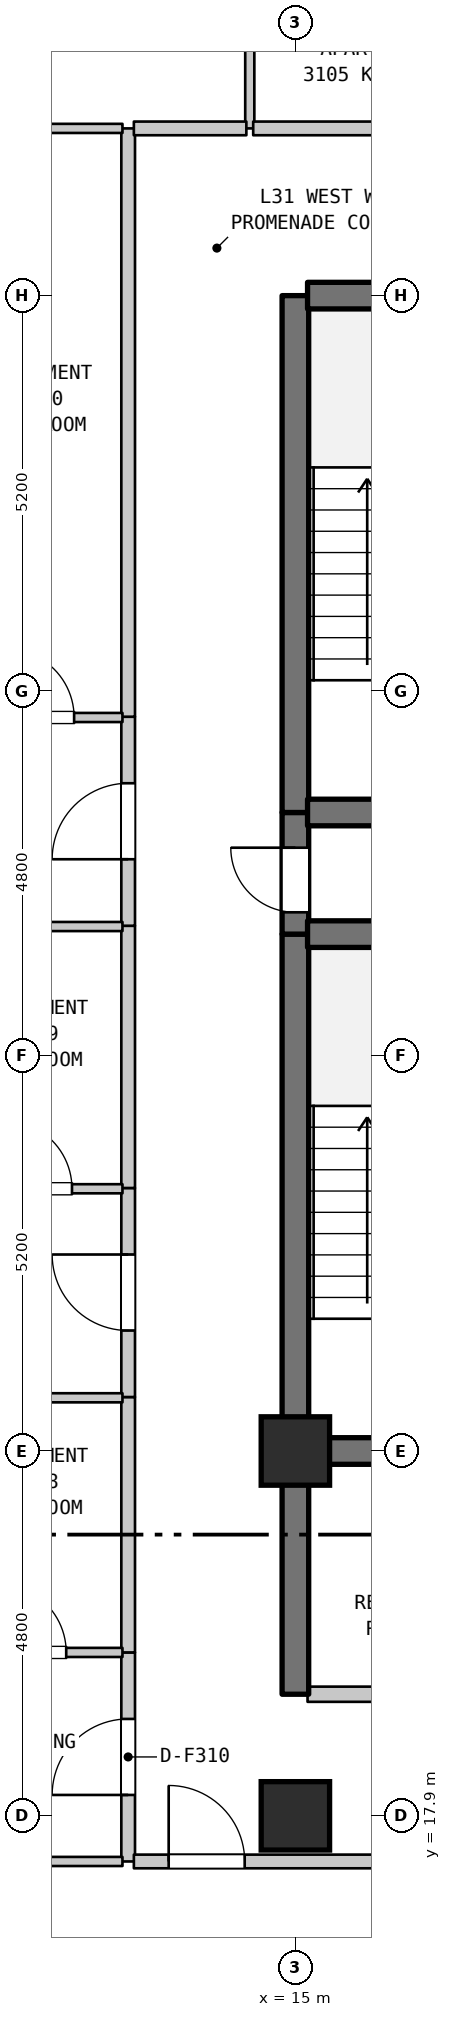
"""IFC4 building model, lengths in metres.
Left out: names, types, materials, properties, quantities, classifications, styles, units other than length and angle.
Written with IfcOpenShell. Run it as: python <this file> out.ifc"""

import sys

from ifc_helpers import new_model, si_unit, direction, frame, frame_2d, origin, origin_2d, place, context, subcontext, project, spatial, rectangle, extrude, element, fill, save


model = new_model("IFC4")
c1 = context("Model", 3, precision=1e-05, world=origin(), true_north=direction((0.0, 1.0)))
c2 = subcontext(c1, "Body", "Model", "MODEL_VIEW")
j1 = project(units=[si_unit("LENGTHUNIT", "METRE"), si_unit("PLANEANGLEUNIT", "RADIAN")], contexts=[c1])
p1 = place(None, origin())
s1 = spatial("IfcSite", under=j1, at=p1, CompositionType="ELEMENT")
p2 = place(p1, origin())
s2 = spatial("IfcBuilding", under=s1, at=p2, CompositionType="ELEMENT")
p3 = place(p2, frame((0.0, 0.0, 129.8)))
s3 = spatial("IfcBuildingStorey", under=s2, at=p3, CompositionType="ELEMENT", Elevation=129.8)
for number, where, z_axis, x_axis in (
    (1, (15.0, 17.9, 0.0), (0.0, 0.0, 1.0), (1.0, 0.0, 0.0)),
    (2, (15.0, 22.7, 0.0), (0.0, 0.0, 1.0), (1.0, 0.0, 0.0)),
):
    element("IfcColumn", number, at=place(p3, frame(where, z_axis=z_axis, x_axis=x_axis)), inside=s3, PredefinedType="COLUMN", context=c2, shape_type="SweptSolid", body=[
        extrude(rectangle(XDim=0.9, YDim=0.9, at=origin_2d()), origin(), (0.0, 0.0, 1.0), 3.7),
    ])
p4 = place(p3, frame((12.8, 17.3, 0.0), z_axis=(0.0, 0.0, 1.0), x_axis=(0.0, 1.0, 0.0)))
e3 = element("IfcWall", 3, at=p4, inside=s3, PredefinedType="STANDARD", context=c2, shape_type="SweptSolid", body=[
    extrude(rectangle(XDim=2.75, YDim=0.18, at=frame_2d((1.375, 0.0))), origin(), (0.0, 0.0, 1.0), 3.385),
])
p5 = place(p4, frame((0.875, 0.0, 0.0)))
e4 = element("IfcOpeningElement", 4, at=p5, cuts=e3, PredefinedType="OPENING", context=c2, shape_type="SweptSolid", body=[
    extrude(rectangle(XDim=1.0, YDim=2.15, at=frame_2d((0.5, 1.075))), frame((0.0, 0.1, 0.0), z_axis=(0.0, -1.0, 0.0), x_axis=(1.0, 0.0, 0.0)), (0.0, 0.0, 1.0), 0.2),
])
p6 = place(p3, frame((12.8, 20.05, 0.0), z_axis=(0.0, 0.0, 1.0), x_axis=(0.0, 1.0, 0.0)))
e5 = element("IfcWall", 5, at=p6, inside=s3, PredefinedType="STANDARD", context=c2, shape_type="SweptSolid", body=[
    extrude(rectangle(XDim=3.36, YDim=0.18, at=frame_2d((1.68, 0.0))), origin(), (0.0, 0.0, 1.0), 3.385),
])
p7 = place(p3, frame((12.8, 23.41, 0.0), z_axis=(0.0, 0.0, 1.0), x_axis=(0.0, 1.0, 0.0)))
e6 = element("IfcWall", 6, at=p7, inside=s3, PredefinedType="STANDARD", context=c2, shape_type="SweptSolid", body=[
    extrude(rectangle(XDim=2.75, YDim=0.18, at=frame_2d((1.375, 0.0))), origin(), (0.0, 0.0, 1.0), 3.385),
])
p8 = place(p7, frame((0.875, 0.0, 0.0)))
e7 = element("IfcOpeningElement", 7, at=p8, cuts=e6, PredefinedType="OPENING", context=c2, shape_type="SweptSolid", body=[
    extrude(rectangle(XDim=1.0, YDim=2.15, at=frame_2d((0.5, 1.075))), frame((0.0, 0.1, 0.0), z_axis=(0.0, -1.0, 0.0), x_axis=(1.0, 0.0, 0.0)), (0.0, 0.0, 1.0), 0.2),
])
p9 = place(p3, frame((12.8, 26.16, 0.0), z_axis=(0.0, 0.0, 1.0), x_axis=(0.0, 1.0, 0.0)))
e8 = element("IfcWall", 8, at=p9, inside=s3, PredefinedType="STANDARD", context=c2, shape_type="SweptSolid", body=[
    extrude(rectangle(XDim=3.45, YDim=0.18, at=frame_2d((1.725, 0.0))), origin(), (0.0, 0.0, 1.0), 3.385),
])
p10 = place(p3, frame((12.8, 29.61, 0.0), z_axis=(0.0, 0.0, 1.0), x_axis=(0.0, 1.0, 0.0)))
e9 = element("IfcWall", 9, at=p10, inside=s3, PredefinedType="STANDARD", context=c2, shape_type="SweptSolid", body=[
    extrude(rectangle(XDim=2.75, YDim=0.18, at=frame_2d((1.375, 0.0))), origin(), (0.0, 0.0, 1.0), 3.385),
])
p11 = place(p10, frame((0.875, 0.0, 0.0)))
e10 = element("IfcOpeningElement", 10, at=p11, cuts=e9, PredefinedType="OPENING", context=c2, shape_type="SweptSolid", body=[
    extrude(rectangle(XDim=1.0, YDim=2.15, at=frame_2d((0.5, 1.075))), frame((0.0, 0.1, 0.0), z_axis=(0.0, -1.0, 0.0), x_axis=(1.0, 0.0, 0.0)), (0.0, 0.0, 1.0), 0.2),
])
p12 = place(p3, frame((12.8, 32.36, 0.0), z_axis=(0.0, 0.0, 1.0), x_axis=(0.0, 1.0, 0.0)))
e11 = element("IfcWall", 11, at=p12, inside=s3, PredefinedType="STANDARD", context=c2, shape_type="SweptSolid", body=[
    extrude(rectangle(XDim=7.74, YDim=0.18, at=frame_2d((3.87, 0.0))), origin(), (0.0, 0.0, 1.0), 3.385),
])
p13 = place(p3, frame((14.4, 40.1, 0.0), z_axis=(0.0, 0.0, 1.0), x_axis=(0.0, 1.0, 0.0)))
e12 = element("IfcWall", 12, at=p13, inside=s3, PredefinedType="PARTITIONING", context=c2, shape_type="SweptSolid", body=[
    extrude(rectangle(XDim=2.3, YDim=0.12, at=frame_2d((1.15, 0.0))), origin(), (0.0, 0.0, 1.0), 3.385),
])
p14 = place(p3, frame((15.0, 19.5, 0.0), z_axis=(0.0, 0.0, 1.0), x_axis=(0.0, 1.0, 0.0)))
e13 = element("IfcWall", 13, at=p14, inside=s3, PredefinedType="SHEAR", context=c2, shape_type="SweptSolid", body=[
    extrude(rectangle(XDim=3.2, YDim=0.35, at=frame_2d((1.6, 0.0))), origin(), (0.0, 0.0, 1.0), 3.385),
])
p15 = place(p3, frame((15.0, 22.7, 0.0), z_axis=(0.0, 0.0, 1.0), x_axis=(0.0, 1.0, 0.0)))
e14 = element("IfcWall", 14, at=p15, inside=s3, PredefinedType="SHEAR", context=c2, shape_type="SweptSolid", body=[
    extrude(rectangle(XDim=6.8, YDim=0.35, at=frame_2d((3.4, 0.0))), origin(), (0.0, 0.0, 1.0), 3.385),
])
p16 = place(p3, frame((15.0, 29.5, 0.0), z_axis=(0.0, 0.0, 1.0), x_axis=(0.0, 1.0, 0.0)))
e15 = element("IfcWall", 15, at=p16, inside=s3, PredefinedType="SHEAR", context=c2, shape_type="SweptSolid", body=[
    extrude(rectangle(XDim=1.6, YDim=0.35, at=frame_2d((0.8, 0.0))), origin(), (0.0, 0.0, 1.0), 3.385),
])
p17 = place(p16, frame((0.287, 0.0, 0.0)))
e16 = element("IfcOpeningElement", 16, at=p17, cuts=e15, PredefinedType="OPENING", context=c2, shape_type="SweptSolid", body=[
    extrude(rectangle(XDim=0.85, YDim=2.1, at=frame_2d((0.425, 1.05))), frame((0.0, 0.185, 0.0), z_axis=(0.0, -1.0, 0.0), x_axis=(1.0, 0.0, 0.0)), (0.0, 0.0, 1.0), 0.37),
])
p18 = place(p3, frame((15.0, 31.1, 0.0), z_axis=(0.0, 0.0, 1.0), x_axis=(0.0, 1.0, 0.0)))
e17 = element("IfcWall", 17, at=p18, inside=s3, PredefinedType="SHEAR", context=c2, shape_type="SweptSolid", body=[
    extrude(rectangle(XDim=6.8, YDim=0.35, at=frame_2d((3.4, 0.0))), origin(), (0.0, 0.0, 1.0), 3.385),
])
p19 = place(p3, frame((9.085, 17.3, 0.0), z_axis=(0.0, 0.0, 1.0), x_axis=(1.0, 0.0, 0.0)))
e18 = element("IfcWall", 18, at=p19, inside=s3, PredefinedType="PARTITIONING", context=c2, shape_type="SweptSolid", body=[
    extrude(rectangle(XDim=3.64, YDim=0.12, at=frame_2d((1.82, 0.0))), origin(), (0.0, 0.0, 1.0), 3.385),
])
p20 = place(p3, frame((12.875, 17.3, 0.0), z_axis=(0.0, 0.0, 1.0), x_axis=(1.0, 0.0, 0.0)))
e19 = element("IfcWall", 19, at=p20, inside=s3, PredefinedType="STANDARD", context=c2, shape_type="SweptSolid", body=[
    extrude(rectangle(XDim=3.78, YDim=0.18, at=frame_2d((1.89, 0.0))), origin(), (0.0, 0.0, 1.0), 3.385),
])
p21 = place(p20, frame((0.458, 0.0, 0.0)))
e20 = element("IfcOpeningElement", 20, at=p21, cuts=e19, PredefinedType="OPENING", context=c2, shape_type="SweptSolid", body=[
    extrude(rectangle(XDim=1.0, YDim=2.15, at=frame_2d((0.5, 1.075))), frame((0.0, 0.1, 0.0), z_axis=(0.0, -1.0, 0.0), x_axis=(1.0, 0.0, 0.0)), (0.0, 0.0, 1.0), 0.2),
])
p22 = place(p3, frame((15.16, 19.5, 0.0), z_axis=(0.0, 0.0, 1.0), x_axis=(1.0, 0.0, 0.0)))
e21 = element("IfcWall", 21, at=p22, inside=s3, PredefinedType="STANDARD", context=c2, shape_type="SweptSolid", body=[
    extrude(rectangle(XDim=3.68, YDim=0.2, at=frame_2d((1.84, 0.0))), origin(), (0.0, 0.0, 1.0), 3.385),
])
p23 = place(p22, frame((1.39, 0.0, 0.0)))
e22 = element("IfcOpeningElement", 22, at=p23, cuts=e21, PredefinedType="OPENING", context=c2, shape_type="SweptSolid", body=[
    extrude(rectangle(XDim=0.9, YDim=2.15, at=frame_2d((0.45, 1.075))), frame((0.0, 0.11, 0.0), z_axis=(0.0, -1.0, 0.0), x_axis=(1.0, 0.0, 0.0)), (0.0, 0.0, 1.0), 0.22),
])
p24 = place(p3, frame((10.456, 20.05, 0.0), z_axis=(0.0, 0.0, 1.0), x_axis=(1.0, 0.0, 0.0)))
e23 = element("IfcWall", 23, at=p24, inside=s3, PredefinedType="PARTITIONING", context=c2, shape_type="SweptSolid", body=[
    extrude(rectangle(XDim=2.269, YDim=0.12, at=frame_2d((1.135, 0.0))), origin(), (0.0, 0.0, 1.0), 3.385),
])
p25 = place(p24, frame((0.629, 0.0, 0.0)))
e24 = element("IfcOpeningElement", 24, at=p25, cuts=e23, PredefinedType="OPENING", context=c2, shape_type="SweptSolid", body=[
    extrude(rectangle(XDim=0.9, YDim=2.1, at=frame_2d((0.45, 1.05))), frame((0.0, 0.07, 0.0), z_axis=(0.0, -1.0, 0.0), x_axis=(1.0, 0.0, 0.0)), (0.0, 0.0, 1.0), 0.14),
])
p26 = place(p3, frame((15.16, 22.7, 0.0), z_axis=(0.0, 0.0, 1.0), x_axis=(1.0, 0.0, 0.0)))
e25 = element("IfcWall", 25, at=p26, inside=s3, PredefinedType="SHEAR", context=c2, shape_type="SweptSolid", body=[
    extrude(rectangle(XDim=3.68, YDim=0.35, at=frame_2d((1.84, 0.0))), origin(), (0.0, 0.0, 1.0), 3.385),
])
p27 = place(p3, frame((10.456, 23.4, 0.0), z_axis=(0.0, 0.0, 1.0), x_axis=(1.0, 0.0, 0.0)))
e26 = element("IfcWall", 26, at=p27, inside=s3, PredefinedType="PARTITIONING", context=c2, shape_type="SweptSolid", body=[
    extrude(rectangle(XDim=2.269, YDim=0.12, at=frame_2d((1.135, 0.0))), origin(), (0.0, 0.0, 1.0), 3.385),
])
p28 = place(p3, frame((10.466, 26.15, 0.0), z_axis=(0.0, 0.0, 1.0), x_axis=(1.0, 0.0, 0.0)))
e27 = element("IfcWall", 27, at=p28, inside=s3, PredefinedType="PARTITIONING", context=c2, shape_type="SweptSolid", body=[
    extrude(rectangle(XDim=2.259, YDim=0.12, at=frame_2d((1.129, 0.0))), origin(), (0.0, 0.0, 1.0), 3.385),
])
p29 = place(p28, frame((0.695, 0.0, 0.0)))
e28 = element("IfcOpeningElement", 28, at=p29, cuts=e27, PredefinedType="OPENING", context=c2, shape_type="SweptSolid", body=[
    extrude(rectangle(XDim=0.9, YDim=2.1, at=frame_2d((0.45, 1.05))), frame((0.0, 0.07, 0.0), z_axis=(0.0, -1.0, 0.0), x_axis=(1.0, 0.0, 0.0)), (0.0, 0.0, 1.0), 0.14),
])
p30 = place(p3, frame((15.16, 29.5, 0.0), z_axis=(0.0, 0.0, 1.0), x_axis=(1.0, 0.0, 0.0)))
e29 = element("IfcWall", 29, at=p30, inside=s3, PredefinedType="SHEAR", context=c2, shape_type="SweptSolid", body=[
    extrude(rectangle(XDim=3.68, YDim=0.35, at=frame_2d((1.84, 0.0))), origin(), (0.0, 0.0, 1.0), 3.385),
])
p31 = place(p3, frame((10.466, 29.6, 0.0), z_axis=(0.0, 0.0, 1.0), x_axis=(1.0, 0.0, 0.0)))
e30 = element("IfcWall", 30, at=p31, inside=s3, PredefinedType="PARTITIONING", context=c2, shape_type="SweptSolid", body=[
    extrude(rectangle(XDim=2.259, YDim=0.12, at=frame_2d((1.129, 0.0))), origin(), (0.0, 0.0, 1.0), 3.385),
])
p32 = place(p3, frame((15.16, 31.1, 0.0), z_axis=(0.0, 0.0, 1.0), x_axis=(1.0, 0.0, 0.0)))
e31 = element("IfcWall", 31, at=p32, inside=s3, PredefinedType="SHEAR", context=c2, shape_type="SweptSolid", body=[
    extrude(rectangle(XDim=3.68, YDim=0.35, at=frame_2d((1.84, 0.0))), origin(), (0.0, 0.0, 1.0), 3.385),
])
p33 = place(p3, frame((10.523, 32.35, 0.0), z_axis=(0.0, 0.0, 1.0), x_axis=(1.0, 0.0, 0.0)))
e32 = element("IfcWall", 32, at=p33, inside=s3, PredefinedType="PARTITIONING", context=c2, shape_type="SweptSolid", body=[
    extrude(rectangle(XDim=2.202, YDim=0.12, at=frame_2d((1.101, 0.0))), origin(), (0.0, 0.0, 1.0), 3.385),
])
p34 = place(p33, frame((0.666, 0.0, 0.0)))
e33 = element("IfcOpeningElement", 33, at=p34, cuts=e32, PredefinedType="OPENING", context=c2, shape_type="SweptSolid", body=[
    extrude(rectangle(XDim=0.9, YDim=2.1, at=frame_2d((0.45, 1.05))), frame((0.0, 0.07, 0.0), z_axis=(0.0, -1.0, 0.0), x_axis=(1.0, 0.0, 0.0)), (0.0, 0.0, 1.0), 0.14),
])
p35 = place(p3, frame((15.16, 37.9, 0.0), z_axis=(0.0, 0.0, 1.0), x_axis=(1.0, 0.0, 0.0)))
e34 = element("IfcWall", 34, at=p35, inside=s3, PredefinedType="SHEAR", context=c2, shape_type="SweptSolid", body=[
    extrude(rectangle(XDim=3.68, YDim=0.35, at=frame_2d((1.84, 0.0))), origin(), (0.0, 0.0, 1.0), 3.385),
])
p36 = place(p3, frame((10.523, 40.1, 0.0), z_axis=(0.0, 0.0, 1.0), x_axis=(1.0, 0.0, 0.0)))
e35 = element("IfcWall", 35, at=p36, inside=s3, PredefinedType="PARTITIONING", context=c2, shape_type="SweptSolid", body=[
    extrude(rectangle(XDim=2.202, YDim=0.12, at=frame_2d((1.101, 0.0))), origin(), (0.0, 0.0, 1.0), 3.385),
])
p37 = place(p3, frame((12.875, 40.1, 0.0), z_axis=(0.0, 0.0, 1.0), x_axis=(1.0, 0.0, 0.0)))
e36 = element("IfcWall", 36, at=p37, inside=s3, PredefinedType="STANDARD", context=c2, shape_type="SweptSolid", body=[
    extrude(rectangle(XDim=1.48, YDim=0.18, at=frame_2d((0.74, 0.0))), origin(), (0.0, 0.0, 1.0), 3.385),
])
p38 = place(p3, frame((14.445, 40.1, 0.0), z_axis=(0.0, 0.0, 1.0), x_axis=(1.0, 0.0, 0.0)))
e37 = element("IfcWall", 37, at=p38, inside=s3, PredefinedType="STANDARD", context=c2, shape_type="SweptSolid", body=[
    extrude(rectangle(XDim=2.684, YDim=0.18, at=frame_2d((1.342, 0.0))), origin(), (0.0, 0.0, 1.0), 3.385),
])
p39 = place(p5, origin())
e38 = element("IfcDoor", 38, at=p39, inside=s3, OperationType="SINGLE_SWING_LEFT", PredefinedType="DOOR", context=c2, shape_type="SweptSolid", body=[
    extrude(rectangle(XDim=1.0, YDim=2.15, at=frame_2d((0.5, 1.075))), frame((0.0, 0.025, 0.0), z_axis=(0.0, -1.0, 0.0), x_axis=(1.0, 0.0, 0.0)), (0.0, 0.0, 1.0), 0.05),
])
fill(e4, e38)
p40 = place(p8, origin())
e39 = element("IfcDoor", 39, at=p40, inside=s3, OperationType="SINGLE_SWING_RIGHT", PredefinedType="DOOR", context=c2, shape_type="SweptSolid", body=[
    extrude(rectangle(XDim=1.0, YDim=2.15, at=frame_2d((0.5, 1.075))), frame((0.0, 0.025, 0.0), z_axis=(0.0, -1.0, 0.0), x_axis=(1.0, 0.0, 0.0)), (0.0, 0.0, 1.0), 0.05),
])
fill(e7, e39)
p41 = place(p11, origin())
e40 = element("IfcDoor", 40, at=p41, inside=s3, OperationType="SINGLE_SWING_LEFT", PredefinedType="DOOR", context=c2, shape_type="SweptSolid", body=[
    extrude(rectangle(XDim=1.0, YDim=2.15, at=frame_2d((0.5, 1.075))), frame((0.0, 0.025, 0.0), z_axis=(0.0, -1.0, 0.0), x_axis=(1.0, 0.0, 0.0)), (0.0, 0.0, 1.0), 0.05),
])
fill(e10, e40)
p42 = place(p17, origin())
e41 = element("IfcDoor", 41, at=p42, inside=s3, OperationType="SINGLE_SWING_RIGHT", PredefinedType="DOOR", context=c2, shape_type="SweptSolid", body=[
    extrude(rectangle(XDim=0.85, YDim=2.1, at=frame_2d((0.425, 1.05))), frame((0.0, 0.025, 0.0), z_axis=(0.0, -1.0, 0.0), x_axis=(1.0, 0.0, 0.0)), (0.0, 0.0, 1.0), 0.05),
])
fill(e16, e41)
p43 = place(p21, origin())
e42 = element("IfcDoor", 42, at=p43, inside=s3, OperationType="SINGLE_SWING_LEFT", PredefinedType="DOOR", context=c2, shape_type="SweptSolid", body=[
    extrude(rectangle(XDim=1.0, YDim=2.15, at=frame_2d((0.5, 1.075))), frame((0.0, 0.025, 0.0), z_axis=(0.0, -1.0, 0.0), x_axis=(1.0, 0.0, 0.0)), (0.0, 0.0, 1.0), 0.05),
])
fill(e20, e42)
p44 = place(p25, origin())
e43 = element("IfcDoor", 43, at=p44, inside=s3, OperationType="SINGLE_SWING_LEFT", PredefinedType="DOOR", context=c2, shape_type="SweptSolid", body=[
    extrude(rectangle(XDim=0.9, YDim=2.1, at=frame_2d((0.45, 1.05))), frame((0.0, 0.025, 0.0), z_axis=(0.0, -1.0, 0.0), x_axis=(1.0, 0.0, 0.0)), (0.0, 0.0, 1.0), 0.05),
])
fill(e24, e43)
p45 = place(p29, origin())
e44 = element("IfcDoor", 44, at=p45, inside=s3, OperationType="SINGLE_SWING_LEFT", PredefinedType="DOOR", context=c2, shape_type="SweptSolid", body=[
    extrude(rectangle(XDim=0.9, YDim=2.1, at=frame_2d((0.45, 1.05))), frame((0.0, 0.025, 0.0), z_axis=(0.0, -1.0, 0.0), x_axis=(1.0, 0.0, 0.0)), (0.0, 0.0, 1.0), 0.05),
])
fill(e28, e44)
p46 = place(p34, origin())
e45 = element("IfcDoor", 45, at=p46, inside=s3, OperationType="SINGLE_SWING_LEFT", PredefinedType="DOOR", context=c2, shape_type="SweptSolid", body=[
    extrude(rectangle(XDim=0.9, YDim=2.1, at=frame_2d((0.45, 1.05))), frame((0.0, 0.025, 0.0), z_axis=(0.0, -1.0, 0.0), x_axis=(1.0, 0.0, 0.0)), (0.0, 0.0, 1.0), 0.05),
])
fill(e33, e45)
save(model, sys.argv[1])
